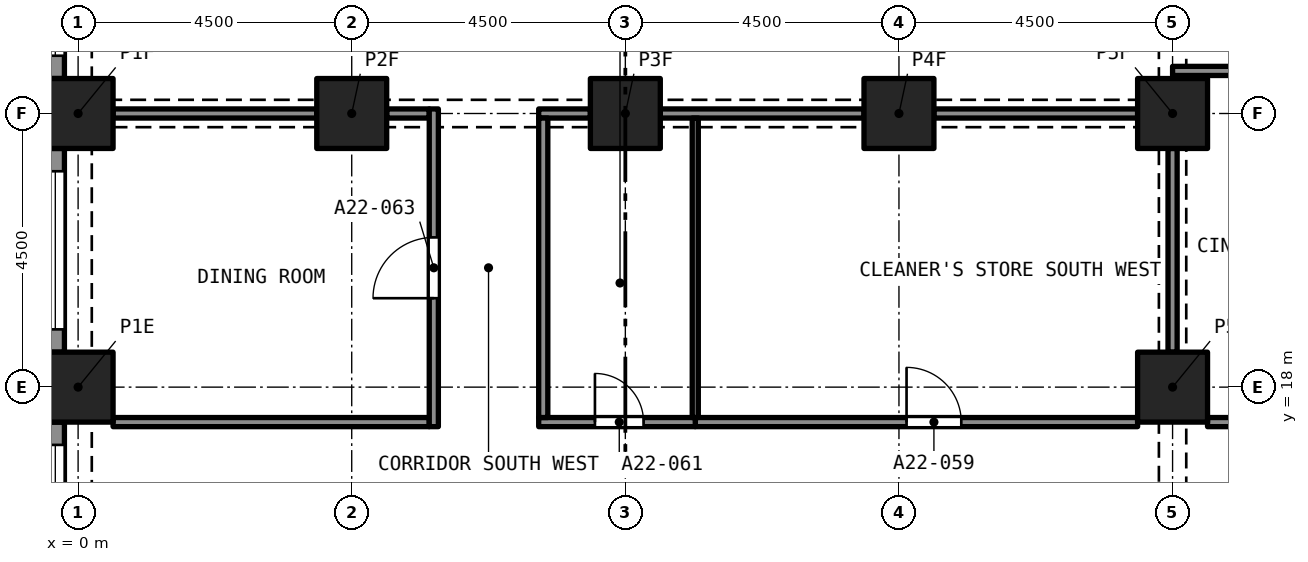
"""IFC4 building model, lengths in metres.
Left out: names, types, materials, properties, quantities, classifications, styles, units other than length and angle.
Written with IfcOpenShell. Run it as: python <this file> out.ifc"""

import sys

from ifc_helpers import new_model, si_unit, direction, frame, frame_2d, origin, origin_2d, place, context, subcontext, project, spatial, rectangle, extrude, element, fill, save


model = new_model("IFC4")
c1 = context("Model", 3, precision=1e-05, world=origin(), true_north=direction((0.0, 1.0)))
c2 = subcontext(c1, "Body", "Model", "MODEL_VIEW")
j1 = project(units=[si_unit("LENGTHUNIT", "METRE"), si_unit("PLANEANGLEUNIT", "RADIAN")], contexts=[c1])
p1 = place(None, origin())
s1 = spatial("IfcSite", under=j1, at=p1, CompositionType="ELEMENT")
p2 = place(p1, origin())
s2 = spatial("IfcBuilding", under=s1, at=p2, CompositionType="ELEMENT")
p3 = place(p2, frame((0.0, 0.0, 83.2)))
s3 = spatial("IfcBuildingStorey", under=s2, at=p3, CompositionType="ELEMENT", Elevation=83.2)
for number, where, z_axis, x_axis in (
    (1, (0.0, 18.0, 0.0), (0.0, 0.0, 1.0), (1.0, 0.0, 0.0)),
    (2, (18.0, 18.0, 0.0), (0.0, 0.0, 1.0), (1.0, 0.0, 0.0)),
    (3, (0.0, 22.5, 0.0), (0.0, 0.0, 1.0), (1.0, 0.0, 0.0)),
    (4, (4.5, 22.5, 0.0), (0.0, 0.0, 1.0), (1.0, 0.0, 0.0)),
    (5, (9.0, 22.5, 0.0), (0.0, 0.0, 1.0), (1.0, 0.0, 0.0)),
    (6, (13.5, 22.5, 0.0), (0.0, 0.0, 1.0), (1.0, 0.0, 0.0)),
    (7, (18.0, 22.5, 0.0), (0.0, 0.0, 1.0), (1.0, 0.0, 0.0)),
):
    element("IfcColumn", number, at=place(p3, frame(where, z_axis=z_axis, x_axis=x_axis)), inside=s3, PredefinedType="COLUMN", context=c2, shape_type="SweptSolid", body=[
        extrude(rectangle(XDim=1.15, YDim=1.15, at=origin_2d()), origin(), (0.0, 0.0, 1.0), 3.2),
    ])
p4 = place(p3, frame((-0.375, 23.075, 0.0), z_axis=(0.0, 0.0, 1.0), x_axis=(0.0, 1.0, 0.0)))
e8 = element("IfcWall", 8, at=p4, inside=s3, PredefinedType="SOLIDWALL", context=c2, shape_type="SweptSolid", body=[
    extrude(rectangle(XDim=3.35, YDim=0.3, at=frame_2d((1.675, 0.0))), origin(), (0.0, 0.0, 1.0), 3.2),
])
p5 = place(p4, frame((0.375, 0.0, 0.45)))
e9 = element("IfcOpeningElement", 9, at=p5, cuts=e8, PredefinedType="OPENING", context=c2, shape_type="SweptSolid", body=[
    extrude(rectangle(XDim=2.6, YDim=1.95, at=frame_2d((1.3, 0.975))), frame((0.0, 0.16, 0.0), z_axis=(0.0, -1.0, 0.0), x_axis=(1.0, 0.0, 0.0)), (0.0, 0.0, 1.0), 0.32),
])
p6 = place(p3, frame((-0.375, 18.575, 0.0), z_axis=(0.0, 0.0, 1.0), x_axis=(0.0, 1.0, 0.0)))
e10 = element("IfcWall", 10, at=p6, inside=s3, PredefinedType="SOLIDWALL", context=c2, shape_type="SweptSolid", body=[
    extrude(rectangle(XDim=3.35, YDim=0.3, at=frame_2d((1.675, 0.0))), origin(), (0.0, 0.0, 1.0), 3.2),
])
p7 = place(p6, frame((0.375, 0.0, 0.45)))
e11 = element("IfcOpeningElement", 11, at=p7, cuts=e10, PredefinedType="OPENING", context=c2, shape_type="SweptSolid", body=[
    extrude(rectangle(XDim=2.6, YDim=1.95, at=frame_2d((1.3, 0.975))), frame((0.0, 0.16, 0.0), z_axis=(0.0, -1.0, 0.0), x_axis=(1.0, 0.0, 0.0)), (0.0, 0.0, 1.0), 0.32),
])
p8 = place(p3, frame((-0.375, 14.075, 0.0), z_axis=(0.0, 0.0, 1.0), x_axis=(0.0, 1.0, 0.0)))
e12 = element("IfcWall", 12, at=p8, inside=s3, PredefinedType="SOLIDWALL", context=c2, shape_type="SweptSolid", body=[
    extrude(rectangle(XDim=3.35, YDim=0.3, at=frame_2d((1.675, 0.0))), origin(), (0.0, 0.0, 1.0), 3.2),
])
p9 = place(p8, frame((0.375, 0.0, 0.45)))
e13 = element("IfcOpeningElement", 13, at=p9, cuts=e12, PredefinedType="OPENING", context=c2, shape_type="SweptSolid", body=[
    extrude(rectangle(XDim=2.6, YDim=1.95, at=frame_2d((1.3, 0.975))), frame((0.0, 0.16, 0.0), z_axis=(0.0, -1.0, 0.0), x_axis=(1.0, 0.0, 0.0)), (0.0, 0.0, 1.0), 0.32),
])
p10 = place(p3, frame((18.575, 17.425, 0.0), z_axis=(0.0, 0.0, 1.0), x_axis=(1.0, 0.0, 0.0)))
e14 = element("IfcWall", 14, at=p10, inside=s3, PredefinedType="PARTITIONING", context=c2, shape_type="SweptSolid", body=[
    extrude(rectangle(XDim=5.2, YDim=0.15, at=frame_2d((2.6, 0.0))), origin(), (0.0, 0.0, 1.0), 2.75),
])
p11 = place(p3, frame((10.15, 17.425, 0.0), z_axis=(0.0, 0.0, 1.0), x_axis=(1.0, 0.0, 0.0)))
e15 = element("IfcWall", 15, at=p11, inside=s3, PredefinedType="PARTITIONING", context=c2, shape_type="SweptSolid", body=[
    extrude(rectangle(XDim=7.275, YDim=0.15, at=frame_2d((3.638, 0.0))), origin(), (0.0, 0.0, 1.0), 2.9),
])
p12 = place(p11, frame((3.475, 0.0, 0.0)))
e16 = element("IfcOpeningElement", 16, at=p12, cuts=e15, PredefinedType="OPENING", context=c2, shape_type="SweptSolid", body=[
    extrude(rectangle(XDim=0.9, YDim=2.1, at=frame_2d((0.45, 1.05))), frame((0.0, 0.085, 0.0), z_axis=(0.0, -1.0, 0.0), x_axis=(1.0, 0.0, 0.0)), (0.0, 0.0, 1.0), 0.17),
])
p13 = place(p3, frame((7.575, 17.425, 0.0), z_axis=(0.0, 0.0, 1.0), x_axis=(1.0, 0.0, 0.0)))
e17 = element("IfcWall", 17, at=p13, inside=s3, PredefinedType="PARTITIONING", context=c2, shape_type="SweptSolid", body=[
    extrude(rectangle(XDim=2.575, YDim=0.15, at=frame_2d((1.288, 0.0))), origin(), (0.0, 0.0, 1.0), 2.9),
])
p14 = place(p13, frame((0.925, 0.0, 0.0)))
e18 = element("IfcOpeningElement", 18, at=p14, cuts=e17, PredefinedType="OPENING", context=c2, shape_type="SweptSolid", body=[
    extrude(rectangle(XDim=0.8, YDim=2.1, at=frame_2d((0.4, 1.05))), frame((0.0, 0.085, 0.0), z_axis=(0.0, -1.0, 0.0), x_axis=(1.0, 0.0, 0.0)), (0.0, 0.0, 1.0), 0.17),
])
p15 = place(p3, frame((0.575, 17.425, 0.0), z_axis=(0.0, 0.0, 1.0), x_axis=(1.0, 0.0, 0.0)))
e19 = element("IfcWall", 19, at=p15, inside=s3, PredefinedType="PARTITIONING", context=c2, shape_type="SweptSolid", body=[
    extrude(rectangle(XDim=5.2, YDim=0.15, at=frame_2d((2.6, 0.0))), origin(), (0.0, 0.0, 1.0), 2.9),
])
p16 = place(p3, frame((18.0, 23.2, 0.0), z_axis=(0.0, 0.0, 1.0), x_axis=(1.0, 0.0, 0.0)))
e20 = element("IfcWall", 20, at=p16, inside=s3, PredefinedType="PARTITIONING", context=c2, shape_type="SweptSolid", body=[
    extrude(rectangle(XDim=5.775, YDim=0.15, at=frame_2d((2.887, 0.0))), origin(), (0.0, 0.0, 1.0), 2.75),
])
for number, where, z_axis, x_axis in (
    (21, (18.0, 18.575, 0.0), (0.0, 0.0, 1.0), (0.0, 1.0, 0.0)),
    (22, (14.075, 22.5, 0.0), (0.0, 0.0, 1.0), (1.0, 0.0, 0.0)),
    (23, (9.575, 22.5, 0.0), (0.0, 0.0, 1.0), (1.0, 0.0, 0.0)),
):
    element("IfcWall", number, at=place(p3, frame(where, z_axis=z_axis, x_axis=x_axis)), inside=s3, PredefinedType="PARTITIONING", context=c2, shape_type="SweptSolid", body=[
        extrude(rectangle(XDim=3.35, YDim=0.15, at=frame_2d((1.675, 0.0))), origin(), (0.0, 0.0, 1.0), 2.38),
    ])
p17 = place(p3, frame((7.575, 22.5, 0.0), z_axis=(0.0, 0.0, 1.0), x_axis=(1.0, 0.0, 0.0)))
e24 = element("IfcWall", 24, at=p17, inside=s3, PredefinedType="PARTITIONING", context=c2, shape_type="SweptSolid", body=[
    extrude(rectangle(XDim=0.85, YDim=0.15, at=frame_2d((0.425, 0.0))), origin(), (0.0, 0.0, 1.0), 2.38),
])
p18 = place(p3, frame((5.075, 22.5, 0.0), z_axis=(0.0, 0.0, 1.0), x_axis=(1.0, 0.0, 0.0)))
e25 = element("IfcWall", 25, at=p18, inside=s3, PredefinedType="PARTITIONING", context=c2, shape_type="SweptSolid", body=[
    extrude(rectangle(XDim=0.7, YDim=0.15, at=frame_2d((0.35, 0.0))), origin(), (0.0, 0.0, 1.0), 2.38),
])
p19 = place(p3, frame((0.575, 22.5, 0.0), z_axis=(0.0, 0.0, 1.0), x_axis=(1.0, 0.0, 0.0)))
e26 = element("IfcWall", 26, at=p19, inside=s3, PredefinedType="PARTITIONING", context=c2, shape_type="SweptSolid", body=[
    extrude(rectangle(XDim=3.35, YDim=0.15, at=frame_2d((1.675, 0.0))), origin(), (0.0, 0.0, 1.0), 2.38),
])
p20 = place(p3, frame((7.65, 17.5, 0.0), z_axis=(0.0, 0.0, 1.0), x_axis=(0.0, 1.0, 0.0)))
e27 = element("IfcWall", 27, at=p20, inside=s3, PredefinedType="PARTITIONING", context=c2, shape_type="SweptSolid", body=[
    extrude(rectangle(XDim=4.925, YDim=0.15, at=frame_2d((2.462, 0.0))), origin(), (0.0, 0.0, 1.0), 2.9),
])
p21 = place(p3, frame((5.85, 17.35, 0.0), z_axis=(0.0, 0.0, 1.0), x_axis=(0.0, 1.0, 0.0)))
e28 = element("IfcWall", 28, at=p21, inside=s3, PredefinedType="PARTITIONING", context=c2, shape_type="SweptSolid", body=[
    extrude(rectangle(XDim=5.225, YDim=0.15, at=frame_2d((2.612, 0.0))), origin(), (0.0, 0.0, 1.0), 2.9),
])
p22 = place(p21, frame((2.113, 0.0, 0.0)))
e29 = element("IfcOpeningElement", 29, at=p22, cuts=e28, PredefinedType="OPENING", context=c2, shape_type="SweptSolid", body=[
    extrude(rectangle(XDim=1.0, YDim=2.1, at=frame_2d((0.5, 1.05))), frame((0.0, 0.085, 0.0), z_axis=(0.0, -1.0, 0.0), x_axis=(1.0, 0.0, 0.0)), (0.0, 0.0, 1.0), 0.17),
])
p23 = place(p3, frame((10.15, 17.5, 0.0), z_axis=(0.0, 0.0, 1.0), x_axis=(0.0, 1.0, 0.0)))
e30 = element("IfcWall", 30, at=p23, inside=s3, PredefinedType="PARTITIONING", context=c2, shape_type="SweptSolid", body=[
    extrude(rectangle(XDim=4.925, YDim=0.1, at=frame_2d((2.462, 0.0))), origin(), (0.0, 0.0, 1.0), 2.9),
])
p24 = place(p5, origin())
e31 = element("IfcWindow", 31, at=p24, inside=s3, PartitioningType="SINGLE_PANEL", PredefinedType="WINDOW", context=c2, shape_type="SweptSolid", body=[
    extrude(rectangle(XDim=2.6, YDim=1.95, at=frame_2d((1.3, 0.975))), frame((0.0, 0.03, 0.0), z_axis=(0.0, -1.0, 0.0), x_axis=(1.0, 0.0, 0.0)), (0.0, 0.0, 1.0), 0.06),
])
fill(e9, e31)
p25 = place(p7, origin())
e32 = element("IfcWindow", 32, at=p25, inside=s3, PartitioningType="SINGLE_PANEL", PredefinedType="WINDOW", context=c2, shape_type="SweptSolid", body=[
    extrude(rectangle(XDim=2.6, YDim=1.95, at=frame_2d((1.3, 0.975))), frame((0.0, 0.03, 0.0), z_axis=(0.0, -1.0, 0.0), x_axis=(1.0, 0.0, 0.0)), (0.0, 0.0, 1.0), 0.06),
])
fill(e11, e32)
p26 = place(p9, origin())
e33 = element("IfcWindow", 33, at=p26, inside=s3, PartitioningType="SINGLE_PANEL", PredefinedType="WINDOW", context=c2, shape_type="SweptSolid", body=[
    extrude(rectangle(XDim=2.6, YDim=1.95, at=frame_2d((1.3, 0.975))), frame((0.0, 0.03, 0.0), z_axis=(0.0, -1.0, 0.0), x_axis=(1.0, 0.0, 0.0)), (0.0, 0.0, 1.0), 0.06),
])
fill(e13, e33)
p27 = place(p12, origin())
e34 = element("IfcDoor", 34, at=p27, inside=s3, OperationType="SINGLE_SWING_RIGHT", PredefinedType="DOOR", context=c2, shape_type="SweptSolid", body=[
    extrude(rectangle(XDim=0.9, YDim=2.1, at=frame_2d((0.45, 1.05))), frame((0.0, 0.025, 0.0), z_axis=(0.0, -1.0, 0.0), x_axis=(1.0, 0.0, 0.0)), (0.0, 0.0, 1.0), 0.05),
])
fill(e16, e34)
p28 = place(p14, origin())
e35 = element("IfcDoor", 35, at=p28, inside=s3, OperationType="SINGLE_SWING_RIGHT", PredefinedType="DOOR", context=c2, shape_type="SweptSolid", body=[
    extrude(rectangle(XDim=0.8, YDim=2.1, at=frame_2d((0.4, 1.05))), frame((0.0, 0.025, 0.0), z_axis=(0.0, -1.0, 0.0), x_axis=(1.0, 0.0, 0.0)), (0.0, 0.0, 1.0), 0.05),
])
fill(e18, e35)
p29 = place(p22, origin())
e36 = element("IfcDoor", 36, at=p29, inside=s3, OperationType="SINGLE_SWING_LEFT", PredefinedType="DOOR", context=c2, shape_type="SweptSolid", body=[
    extrude(rectangle(XDim=1.0, YDim=2.1, at=frame_2d((0.5, 1.05))), frame((0.0, 0.025, 0.0), z_axis=(0.0, -1.0, 0.0), x_axis=(1.0, 0.0, 0.0)), (0.0, 0.0, 1.0), 0.05),
])
fill(e29, e36)
save(model, sys.argv[1])
